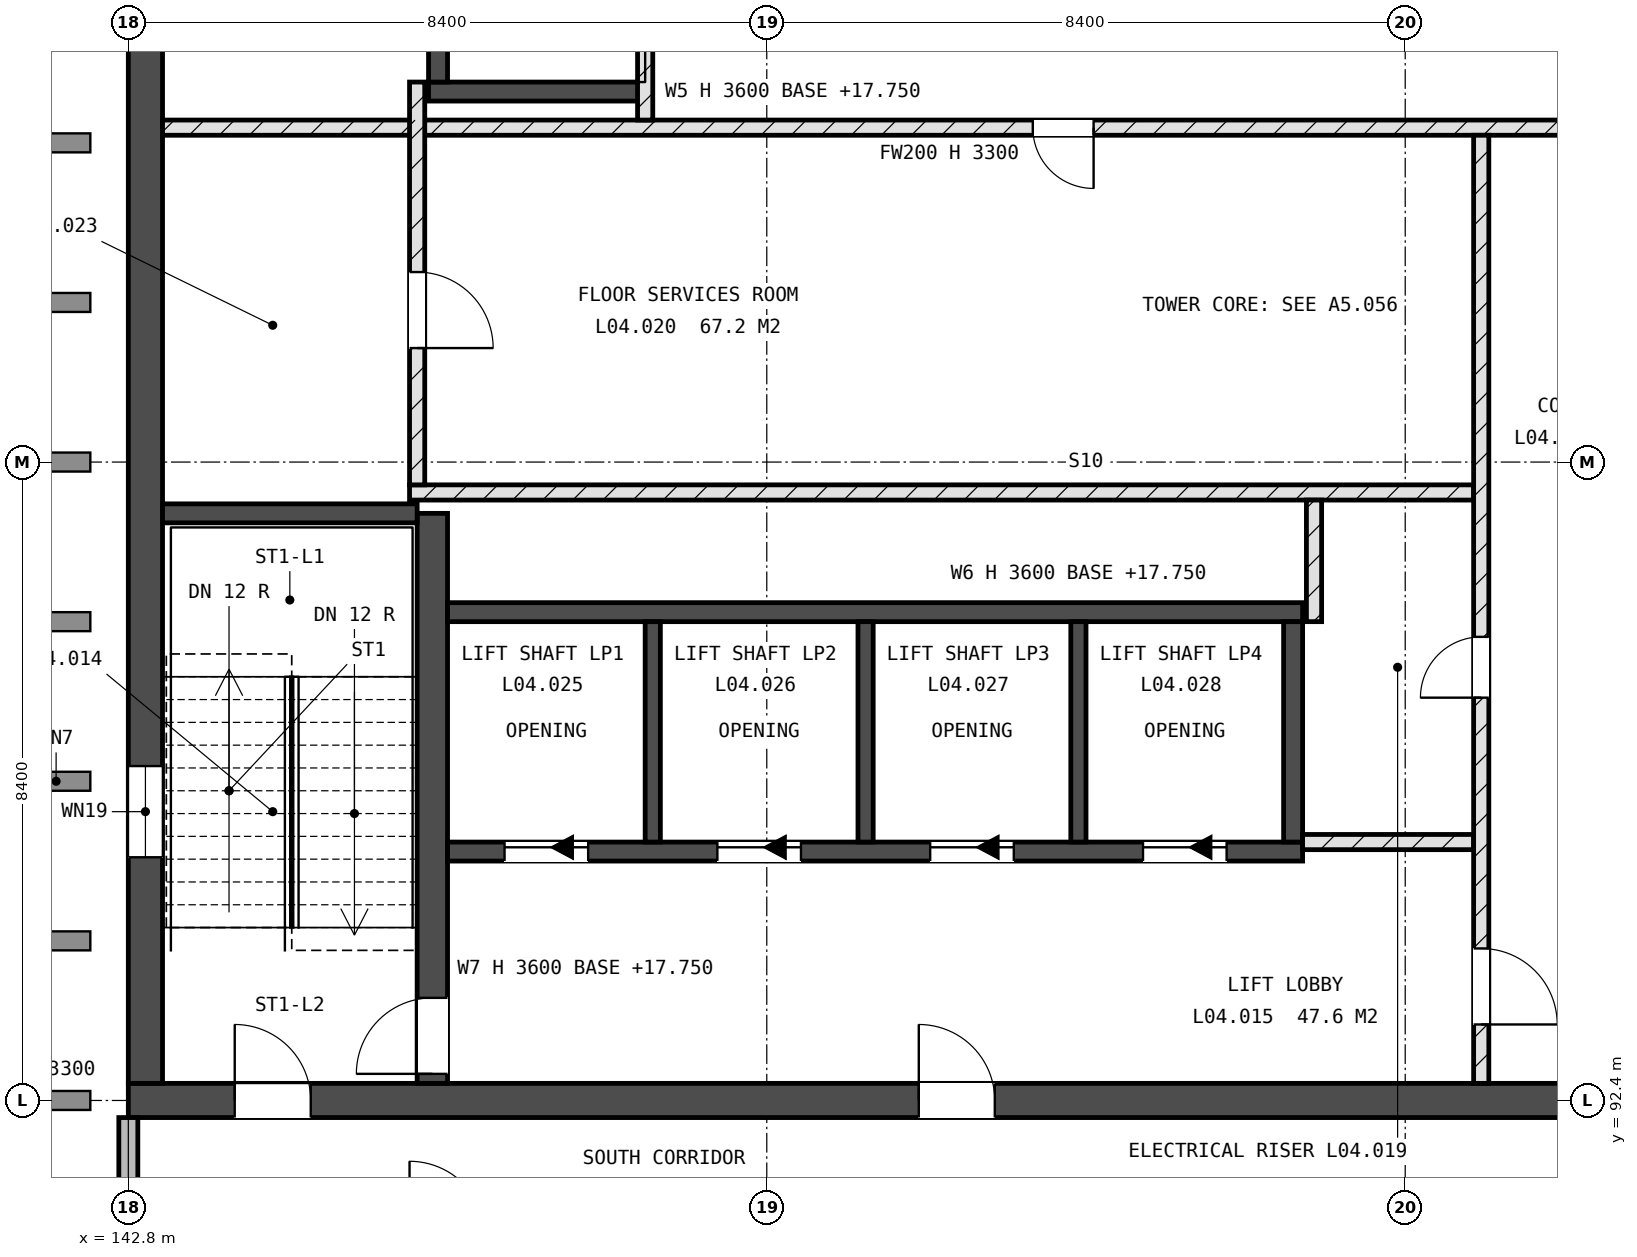
"""IFC4 building model, lengths in metres.
Left out: names, types, materials, properties, quantities, classifications, styles, units other than length and angle.
Written with IfcOpenShell. Run it as: python <this file> out.ifc"""

import sys

from ifc_helpers import new_model, si_unit, direction, frame, frame_2d, origin, place, context, subcontext, project, spatial, rectangle, extrude, element, fill, save


model = new_model("IFC4")
c1 = context("Model", 3, precision=1e-05, world=origin(), true_north=direction((0.0, 1.0)))
c2 = subcontext(c1, "Body", "Model", "MODEL_VIEW")
j1 = project(units=[si_unit("LENGTHUNIT", "METRE"), si_unit("PLANEANGLEUNIT", "RADIAN")], contexts=[c1])
p1 = place(None, origin())
s1 = spatial("IfcSite", under=j1, at=p1, CompositionType="ELEMENT")
p2 = place(p1, origin())
s2 = spatial("IfcBuilding", under=s1, at=p2, CompositionType="ELEMENT")
p3 = place(p2, frame((0.0, 0.0, 18.0)))
s3 = spatial("IfcBuildingStorey", under=s2, at=p3, CompositionType="ELEMENT", Elevation=18.0)
p4 = place(p3, frame((142.8, 92.4, -0.25), z_axis=(0.0, 0.0, 1.0), x_axis=(1.0, 0.0, 0.0)))
e1 = element("IfcWall", 1, at=p4, inside=s3, PredefinedType="SHEAR", context=c2, shape_type="SweptSolid", body=[
    extrude(rectangle(XDim=25.2, YDim=0.45, at=frame_2d((12.6, 0.0))), origin(), (0.0, 0.0, 1.0), 3.6),
])
p5 = place(p4, frame((1.4, 0.0, 0.25)))
e2 = element("IfcOpeningElement", 2, at=p5, cuts=e1, PredefinedType="OPENING", context=c2, shape_type="SweptSolid", body=[
    extrude(rectangle(XDim=1.0, YDim=2.1, at=frame_2d((0.5, 1.05))), frame((0.0, 0.235, 0.0), z_axis=(0.0, -1.0, 0.0), x_axis=(1.0, 0.0, 0.0)), (0.0, 0.0, 1.0), 0.47),
])
p6 = place(p4, frame((19.1, 0.0, 0.25)))
e3 = element("IfcOpeningElement", 3, at=p6, cuts=e1, PredefinedType="OPENING", context=c2, shape_type="SweptSolid", body=[
    extrude(rectangle(XDim=1.0, YDim=2.1, at=frame_2d((0.5, 1.05))), frame((0.0, 0.235, 0.0), z_axis=(0.0, -1.0, 0.0), x_axis=(1.0, 0.0, 0.0)), (0.0, 0.0, 1.0), 0.47),
])
p7 = place(p4, frame((10.4, 0.0, 0.25)))
e4 = element("IfcOpeningElement", 4, at=p7, cuts=e1, PredefinedType="OPENING", context=c2, shape_type="SweptSolid", body=[
    extrude(rectangle(XDim=1.0, YDim=2.1, at=frame_2d((0.5, 1.05))), frame((0.0, 0.235, 0.0), z_axis=(0.0, -1.0, 0.0), x_axis=(1.0, 0.0, 0.0)), (0.0, 0.0, 1.0), 0.47),
])
p8 = place(p3, frame((143.025, 92.625, -0.25), z_axis=(0.0, 0.0, 1.0), x_axis=(0.0, 1.0, 0.0)))
e5 = element("IfcWall", 5, at=p8, inside=s3, PredefinedType="SHEAR", context=c2, shape_type="SweptSolid", body=[
    extrude(rectangle(XDim=16.35, YDim=0.45, at=frame_2d((8.175, 0.0))), origin(), (0.0, 0.0, 1.0), 3.6),
])
p9 = place(p8, frame((2.975, 0.0, 1.85)))
e6 = element("IfcOpeningElement", 6, at=p9, cuts=e5, PredefinedType="OPENING", context=c2, shape_type="SweptSolid", body=[
    extrude(rectangle(XDim=1.2, YDim=0.9, at=frame_2d((0.6, 0.45))), frame((0.0, 0.235, 0.0), z_axis=(0.0, -1.0, 0.0), x_axis=(1.0, 0.0, 0.0)), (0.0, 0.0, 1.0), 0.47),
])
p10 = place(p3, frame((146.8, 92.625, -0.25), z_axis=(0.0, 0.0, 1.0), x_axis=(0.0, 1.0, 0.0)))
e7 = element("IfcWall", 7, at=p10, inside=s3, PredefinedType="SHEAR", context=c2, shape_type="SweptSolid", body=[
    extrude(rectangle(XDim=7.5, YDim=0.4, at=frame_2d((3.75, 0.0))), origin(), (0.0, 0.0, 1.0), 3.6),
])
p11 = place(p10, frame((0.125, 0.0, 0.25)))
e8 = element("IfcOpeningElement", 8, at=p11, cuts=e7, PredefinedType="OPENING", context=c2, shape_type="SweptSolid", body=[
    extrude(rectangle(XDim=1.0, YDim=2.1, at=frame_2d((0.5, 1.05))), frame((0.0, 0.21, 0.0), z_axis=(0.0, -1.0, 0.0), x_axis=(1.0, 0.0, 0.0)), (0.0, 0.0, 1.0), 0.42),
])
p12 = place(p3, frame((143.25, 100.125, -0.25), z_axis=(0.0, 0.0, 1.0), x_axis=(1.0, 0.0, 0.0)))
e9 = element("IfcWall", 9, at=p12, inside=s3, PredefinedType="SHEAR", context=c2, shape_type="SweptSolid", body=[
    extrude(rectangle(XDim=3.35, YDim=0.25, at=frame_2d((1.675, 0.0))), origin(), (0.0, 0.0, 1.0), 3.6),
])
p13 = place(p3, frame((147.0, 95.675, -0.25), z_axis=(0.0, 0.0, 1.0), x_axis=(1.0, 0.0, 0.0)))
e10 = element("IfcWall", 10, at=p13, inside=s3, PredefinedType="SHEAR", context=c2, shape_type="SweptSolid", body=[
    extrude(rectangle(XDim=11.25, YDim=0.25, at=frame_2d((5.625, 0.0))), origin(), (0.0, 0.0, 1.0), 3.6),
])
p14 = place(p13, frame((0.75, 0.0, 0.25)))
e11 = element("IfcOpeningElement", 11, at=p14, cuts=e10, PredefinedType="OPENING", context=c2, shape_type="SweptSolid", body=[
    extrude(rectangle(XDim=1.1, YDim=2.1, at=frame_2d((0.55, 1.05))), frame((0.0, 0.135, 0.0), z_axis=(0.0, -1.0, 0.0), x_axis=(1.0, 0.0, 0.0)), (0.0, 0.0, 1.0), 0.27),
])
p15 = place(p13, frame((3.55, 0.0, 0.25)))
e12 = element("IfcOpeningElement", 12, at=p15, cuts=e10, PredefinedType="OPENING", context=c2, shape_type="SweptSolid", body=[
    extrude(rectangle(XDim=1.1, YDim=2.1, at=frame_2d((0.55, 1.05))), frame((0.0, 0.135, 0.0), z_axis=(0.0, -1.0, 0.0), x_axis=(1.0, 0.0, 0.0)), (0.0, 0.0, 1.0), 0.27),
])
p16 = place(p13, frame((6.35, 0.0, 0.25)))
e13 = element("IfcOpeningElement", 13, at=p16, cuts=e10, PredefinedType="OPENING", context=c2, shape_type="SweptSolid", body=[
    extrude(rectangle(XDim=1.1, YDim=2.1, at=frame_2d((0.55, 1.05))), frame((0.0, 0.135, 0.0), z_axis=(0.0, -1.0, 0.0), x_axis=(1.0, 0.0, 0.0)), (0.0, 0.0, 1.0), 0.27),
])
p17 = place(p13, frame((9.15, 0.0, 0.25)))
e14 = element("IfcOpeningElement", 14, at=p17, cuts=e10, PredefinedType="OPENING", context=c2, shape_type="SweptSolid", body=[
    extrude(rectangle(XDim=1.1, YDim=2.1, at=frame_2d((0.55, 1.05))), frame((0.0, 0.135, 0.0), z_axis=(0.0, -1.0, 0.0), x_axis=(1.0, 0.0, 0.0)), (0.0, 0.0, 1.0), 0.27),
])
p18 = place(p3, frame((147.0, 98.825, -0.25), z_axis=(0.0, 0.0, 1.0), x_axis=(1.0, 0.0, 0.0)))
e15 = element("IfcWall", 15, at=p18, inside=s3, PredefinedType="SHEAR", context=c2, shape_type="SweptSolid", body=[
    extrude(rectangle(XDim=11.25, YDim=0.25, at=frame_2d((5.625, 0.0))), origin(), (0.0, 0.0, 1.0), 3.6),
])
p19 = place(p3, frame((158.125, 95.8, -0.25), z_axis=(0.0, 0.0, 1.0), x_axis=(0.0, 1.0, 0.0)))
e16 = element("IfcWall", 16, at=p19, inside=s3, PredefinedType="SHEAR", context=c2, shape_type="SweptSolid", body=[
    extrude(rectangle(XDim=2.9, YDim=0.25, at=frame_2d((1.45, 0.0))), origin(), (0.0, 0.0, 1.0), 3.6),
])
for number, where, z_axis, x_axis in (
    (17, (149.7, 95.8, -0.25), (0.0, 0.0, 1.0), (0.0, 1.0, 0.0)),
    (18, (152.5, 95.8, -0.25), (0.0, 0.0, 1.0), (0.0, 1.0, 0.0)),
    (19, (155.3, 95.8, -0.25), (0.0, 0.0, 1.0), (0.0, 1.0, 0.0)),
):
    element("IfcWall", number, at=place(p3, frame(where, z_axis=z_axis, x_axis=x_axis)), inside=s3, PredefinedType="SHEAR", context=c2, shape_type="SweptSolid", body=[
        extrude(rectangle(XDim=2.9, YDim=0.2, at=frame_2d((1.45, 0.0))), origin(), (0.0, 0.0, 1.0), 3.6),
    ])
p20 = place(p3, frame((146.75, 105.675, -0.25), z_axis=(0.0, 0.0, 1.0), x_axis=(1.0, 0.0, 0.0)))
e20 = element("IfcWall", 20, at=p20, inside=s3, PredefinedType="SHEAR", context=c2, shape_type="SweptSolid", body=[
    extrude(rectangle(XDim=2.85, YDim=0.25, at=frame_2d((1.425, 0.0))), origin(), (0.0, 0.0, 1.0), 3.6),
])
p21 = place(p3, frame((146.875, 105.8, -0.25), z_axis=(0.0, 0.0, 1.0), x_axis=(0.0, 1.0, 0.0)))
e21 = element("IfcWall", 21, at=p21, inside=s3, PredefinedType="SHEAR", context=c2, shape_type="SweptSolid", body=[
    extrude(rectangle(XDim=2.9, YDim=0.25, at=frame_2d((1.45, 0.0))), origin(), (0.0, 0.0, 1.0), 3.6),
])
p22 = place(p3, frame((142.8, 84.5, 0.0), z_axis=(0.0, 0.0, 1.0), x_axis=(0.0, 1.0, 0.0)))
e22 = element("IfcWall", 22, at=p22, inside=s3, PredefinedType="STANDARD", context=c2, shape_type="SweptSolid", body=[
    extrude(rectangle(XDim=7.675, YDim=0.25, at=frame_2d((3.837, 0.0))), origin(), (0.0, 0.0, 1.0), 3.3),
])
p23 = place(p22, frame((2.2, 0.0, 2.1)))
e23 = element("IfcOpeningElement", 23, at=p23, cuts=e22, PredefinedType="OPENING", context=c2, shape_type="SweptSolid", body=[
    extrude(rectangle(XDim=0.9, YDim=0.6, at=frame_2d((0.45, 0.3))), frame((0.0, 0.135, 0.0), z_axis=(0.0, -1.0, 0.0), x_axis=(1.0, 0.0, 0.0)), (0.0, 0.0, 1.0), 0.27),
])
p24 = place(p3, frame((158.25, 95.8, 0.0), z_axis=(0.0, 0.0, 1.0), x_axis=(1.0, 0.0, 0.0)))
e24 = element("IfcWall", 24, at=p24, inside=s3, PredefinedType="SOLIDWALL", context=c2, shape_type="SweptSolid", body=[
    extrude(rectangle(XDim=2.25, YDim=0.2, at=frame_2d((1.125, 0.0))), origin(), (0.0, 0.0, 1.0), 3.3),
])
p25 = place(p3, frame((146.5, 100.4, 0.0), z_axis=(0.0, 0.0, 1.0), x_axis=(1.0, 0.0, 0.0)))
e25 = element("IfcWall", 25, at=p25, inside=s3, PredefinedType="SOLIDWALL", context=c2, shape_type="SweptSolid", body=[
    extrude(rectangle(XDim=14.0, YDim=0.2, at=frame_2d((7.0, 0.0))), origin(), (0.0, 0.0, 1.0), 3.3),
])
p26 = place(p3, frame((143.25, 105.2, 0.0), z_axis=(0.0, 0.0, 1.0), x_axis=(1.0, 0.0, 0.0)))
e26 = element("IfcWall", 26, at=p26, inside=s3, PredefinedType="SOLIDWALL", context=c2, shape_type="SweptSolid", body=[
    extrude(rectangle(XDim=20.7, YDim=0.2, at=frame_2d((10.35, 0.0))), origin(), (0.0, 0.0, 1.0), 3.3),
])
p27 = place(p26, frame((11.45, 0.0, 0.0)))
e27 = element("IfcOpeningElement", 27, at=p27, cuts=e26, PredefinedType="OPENING", context=c2, shape_type="SweptSolid", body=[
    extrude(rectangle(XDim=0.8, YDim=2.1, at=frame_2d((0.4, 1.05))), frame((0.0, 0.11, 0.0), z_axis=(0.0, -1.0, 0.0), x_axis=(1.0, 0.0, 0.0)), (0.0, 0.0, 1.0), 0.22),
])
p28 = place(p26, frame((18.75, 0.0, 0.0)))
e28 = element("IfcOpeningElement", 28, at=p28, cuts=e26, PredefinedType="OPENING", context=c2, shape_type="SweptSolid", body=[
    extrude(rectangle(XDim=1.0, YDim=2.1, at=frame_2d((0.5, 1.05))), frame((0.0, 0.11, 0.0), z_axis=(0.0, -1.0, 0.0), x_axis=(1.0, 0.0, 0.0)), (0.0, 0.0, 1.0), 0.22),
])
p29 = place(p3, frame((146.6, 100.5, 0.0), z_axis=(0.0, 0.0, 1.0), x_axis=(0.0, 1.0, 0.0)))
e29 = element("IfcWall", 29, at=p29, inside=s3, PredefinedType="SOLIDWALL", context=c2, shape_type="SweptSolid", body=[
    extrude(rectangle(XDim=5.3, YDim=0.2, at=frame_2d((2.65, 0.0))), origin(), (0.0, 0.0, 1.0), 3.3),
])
p30 = place(p29, frame((1.8, 0.0, 0.0)))
e30 = element("IfcOpeningElement", 30, at=p30, cuts=e29, PredefinedType="OPENING", context=c2, shape_type="SweptSolid", body=[
    extrude(rectangle(XDim=1.0, YDim=2.1, at=frame_2d((0.5, 1.05))), frame((0.0, 0.11, 0.0), z_axis=(0.0, -1.0, 0.0), x_axis=(1.0, 0.0, 0.0)), (0.0, 0.0, 1.0), 0.22),
])
p31 = place(p3, frame((149.6, 105.3, 0.0), z_axis=(0.0, 0.0, 1.0), x_axis=(0.0, 1.0, 0.0)))
e31 = element("IfcWall", 31, at=p31, inside=s3, PredefinedType="SOLIDWALL", context=c2, shape_type="SweptSolid", body=[
    extrude(rectangle(XDim=3.675, YDim=0.2, at=frame_2d((1.837, 0.0))), origin(), (0.0, 0.0, 1.0), 3.3),
])
p32 = place(p31, frame((1.4, 0.0, 0.0)))
e32 = element("IfcOpeningElement", 32, at=p32, cuts=e31, PredefinedType="OPENING", context=c2, shape_type="SweptSolid", body=[
    extrude(rectangle(XDim=1.1, YDim=2.1, at=frame_2d((0.55, 1.05))), frame((0.0, 0.11, 0.0), z_axis=(0.0, -1.0, 0.0), x_axis=(1.0, 0.0, 0.0)), (0.0, 0.0, 1.0), 0.22),
])
p33 = place(p3, frame((158.4, 98.7, 0.0), z_axis=(0.0, 0.0, 1.0), x_axis=(0.0, 1.0, 0.0)))
e33 = element("IfcWall", 33, at=p33, inside=s3, PredefinedType="SOLIDWALL", context=c2, shape_type="SweptSolid", body=[
    extrude(rectangle(XDim=1.6, YDim=0.2, at=frame_2d((0.8, 0.0))), origin(), (0.0, 0.0, 1.0), 3.3),
])
p34 = place(p3, frame((160.6, 92.625, 0.0), z_axis=(0.0, 0.0, 1.0), x_axis=(0.0, 1.0, 0.0)))
e34 = element("IfcWall", 34, at=p34, inside=s3, PredefinedType="SOLIDWALL", context=c2, shape_type="SweptSolid", body=[
    extrude(rectangle(XDim=12.475, YDim=0.2, at=frame_2d((6.238, 0.0))), origin(), (0.0, 0.0, 1.0), 3.3),
])
p35 = place(p34, frame((5.075, 0.0, 0.0)))
e35 = element("IfcOpeningElement", 35, at=p35, cuts=e34, PredefinedType="OPENING", context=c2, shape_type="SweptSolid", body=[
    extrude(rectangle(XDim=0.8, YDim=2.1, at=frame_2d((0.4, 1.05))), frame((0.0, 0.11, 0.0), z_axis=(0.0, -1.0, 0.0), x_axis=(1.0, 0.0, 0.0)), (0.0, 0.0, 1.0), 0.22),
])
p36 = place(p34, frame((0.775, 0.0, 0.0)))
e36 = element("IfcOpeningElement", 36, at=p36, cuts=e34, PredefinedType="OPENING", context=c2, shape_type="SweptSolid", body=[
    extrude(rectangle(XDim=1.0, YDim=2.1, at=frame_2d((0.5, 1.05))), frame((0.0, 0.11, 0.0), z_axis=(0.0, -1.0, 0.0), x_axis=(1.0, 0.0, 0.0)), (0.0, 0.0, 1.0), 0.22),
])
p37 = place(p9, origin())
e37 = element("IfcWindow", 37, at=p37, inside=s3, PartitioningType="SINGLE_PANEL", PredefinedType="WINDOW", context=c2, shape_type="SweptSolid", body=[
    extrude(rectangle(XDim=1.2, YDim=0.9, at=frame_2d((0.6, 0.45))), frame((0.0, 0.03, 0.0), z_axis=(0.0, -1.0, 0.0), x_axis=(1.0, 0.0, 0.0)), (0.0, 0.0, 1.0), 0.06),
])
fill(e6, e37)
p38 = place(p14, origin())
e38 = element("IfcDoor", 38, at=p38, inside=s3, OperationType="SLIDING_TO_LEFT", PredefinedType="DOOR", context=c2, shape_type="SweptSolid", body=[
    extrude(rectangle(XDim=1.1, YDim=2.1, at=frame_2d((0.55, 1.05))), frame((0.0, 0.025, 0.0), z_axis=(0.0, -1.0, 0.0), x_axis=(1.0, 0.0, 0.0)), (0.0, 0.0, 1.0), 0.05),
])
fill(e11, e38)
p39 = place(p15, origin())
e39 = element("IfcDoor", 39, at=p39, inside=s3, OperationType="SLIDING_TO_LEFT", PredefinedType="DOOR", context=c2, shape_type="SweptSolid", body=[
    extrude(rectangle(XDim=1.1, YDim=2.1, at=frame_2d((0.55, 1.05))), frame((0.0, 0.025, 0.0), z_axis=(0.0, -1.0, 0.0), x_axis=(1.0, 0.0, 0.0)), (0.0, 0.0, 1.0), 0.05),
])
fill(e12, e39)
p40 = place(p16, origin())
e40 = element("IfcDoor", 40, at=p40, inside=s3, OperationType="SLIDING_TO_LEFT", PredefinedType="DOOR", context=c2, shape_type="SweptSolid", body=[
    extrude(rectangle(XDim=1.1, YDim=2.1, at=frame_2d((0.55, 1.05))), frame((0.0, 0.025, 0.0), z_axis=(0.0, -1.0, 0.0), x_axis=(1.0, 0.0, 0.0)), (0.0, 0.0, 1.0), 0.05),
])
fill(e13, e40)
p41 = place(p17, origin())
e41 = element("IfcDoor", 41, at=p41, inside=s3, OperationType="SLIDING_TO_LEFT", PredefinedType="DOOR", context=c2, shape_type="SweptSolid", body=[
    extrude(rectangle(XDim=1.1, YDim=2.1, at=frame_2d((0.55, 1.05))), frame((0.0, 0.025, 0.0), z_axis=(0.0, -1.0, 0.0), x_axis=(1.0, 0.0, 0.0)), (0.0, 0.0, 1.0), 0.05),
])
fill(e14, e41)
p42 = place(p5, origin())
e42 = element("IfcDoor", 42, at=p42, inside=s3, OperationType="SINGLE_SWING_RIGHT", PredefinedType="DOOR", context=c2, shape_type="SweptSolid", body=[
    extrude(rectangle(XDim=1.0, YDim=2.1, at=frame_2d((0.5, 1.05))), frame((0.0, 0.025, 0.0), z_axis=(0.0, -1.0, 0.0), x_axis=(1.0, 0.0, 0.0)), (0.0, 0.0, 1.0), 0.05),
])
fill(e2, e42)
p43 = place(p11, origin())
e43 = element("IfcDoor", 43, at=p43, inside=s3, OperationType="SINGLE_SWING_RIGHT", PredefinedType="DOOR", context=c2, shape_type="SweptSolid", body=[
    extrude(rectangle(XDim=1.0, YDim=2.1, at=frame_2d((0.5, 1.05))), frame((0.0, 0.025, 0.0), z_axis=(0.0, -1.0, 0.0), x_axis=(1.0, 0.0, 0.0)), (0.0, 0.0, 1.0), 0.05),
])
fill(e8, e43)
p44 = place(p35, origin())
e44 = element("IfcDoor", 44, at=p44, inside=s3, OperationType="SINGLE_SWING_RIGHT", PredefinedType="DOOR", context=c2, shape_type="SweptSolid", body=[
    extrude(rectangle(XDim=0.8, YDim=2.1, at=frame_2d((0.4, 1.05))), frame((0.0, 0.025, 0.0), z_axis=(0.0, -1.0, 0.0), x_axis=(1.0, 0.0, 0.0)), (0.0, 0.0, 1.0), 0.05),
])
fill(e35, e44)
p45 = place(p27, origin())
e45 = element("IfcDoor", 45, at=p45, inside=s3, OperationType="SINGLE_SWING_RIGHT", PredefinedType="DOOR", context=c2, shape_type="SweptSolid", body=[
    extrude(rectangle(XDim=0.8, YDim=2.1, at=frame_2d((0.4, 1.05))), frame((0.0, 0.025, 0.0), z_axis=(0.0, -1.0, 0.0), x_axis=(1.0, 0.0, 0.0)), (0.0, 0.0, 1.0), 0.05),
])
fill(e27, e45)
p46 = place(p30, origin())
e46 = element("IfcDoor", 46, at=p46, inside=s3, OperationType="SINGLE_SWING_LEFT", PredefinedType="DOOR", context=c2, shape_type="SweptSolid", body=[
    extrude(rectangle(XDim=1.0, YDim=2.1, at=frame_2d((0.5, 1.05))), frame((0.0, 0.025, 0.0), z_axis=(0.0, -1.0, 0.0), x_axis=(1.0, 0.0, 0.0)), (0.0, 0.0, 1.0), 0.05),
])
fill(e30, e46)
p47 = place(p7, origin())
e47 = element("IfcDoor", 47, at=p47, inside=s3, OperationType="SINGLE_SWING_RIGHT", PredefinedType="DOOR", context=c2, shape_type="SweptSolid", body=[
    extrude(rectangle(XDim=1.0, YDim=2.1, at=frame_2d((0.5, 1.05))), frame((0.0, 0.025, 0.0), z_axis=(0.0, -1.0, 0.0), x_axis=(1.0, 0.0, 0.0)), (0.0, 0.0, 1.0), 0.05),
])
fill(e4, e47)
p48 = place(p36, origin())
e48 = element("IfcDoor", 48, at=p48, inside=s3, OperationType="SINGLE_SWING_LEFT", PredefinedType="DOOR", context=c2, shape_type="SweptSolid", body=[
    extrude(rectangle(XDim=1.0, YDim=2.1, at=frame_2d((0.5, 1.05))), frame((0.0, 0.025, 0.0), z_axis=(0.0, -1.0, 0.0), x_axis=(1.0, 0.0, 0.0)), (0.0, 0.0, 1.0), 0.05),
])
fill(e36, e48)
save(model, sys.argv[1])
